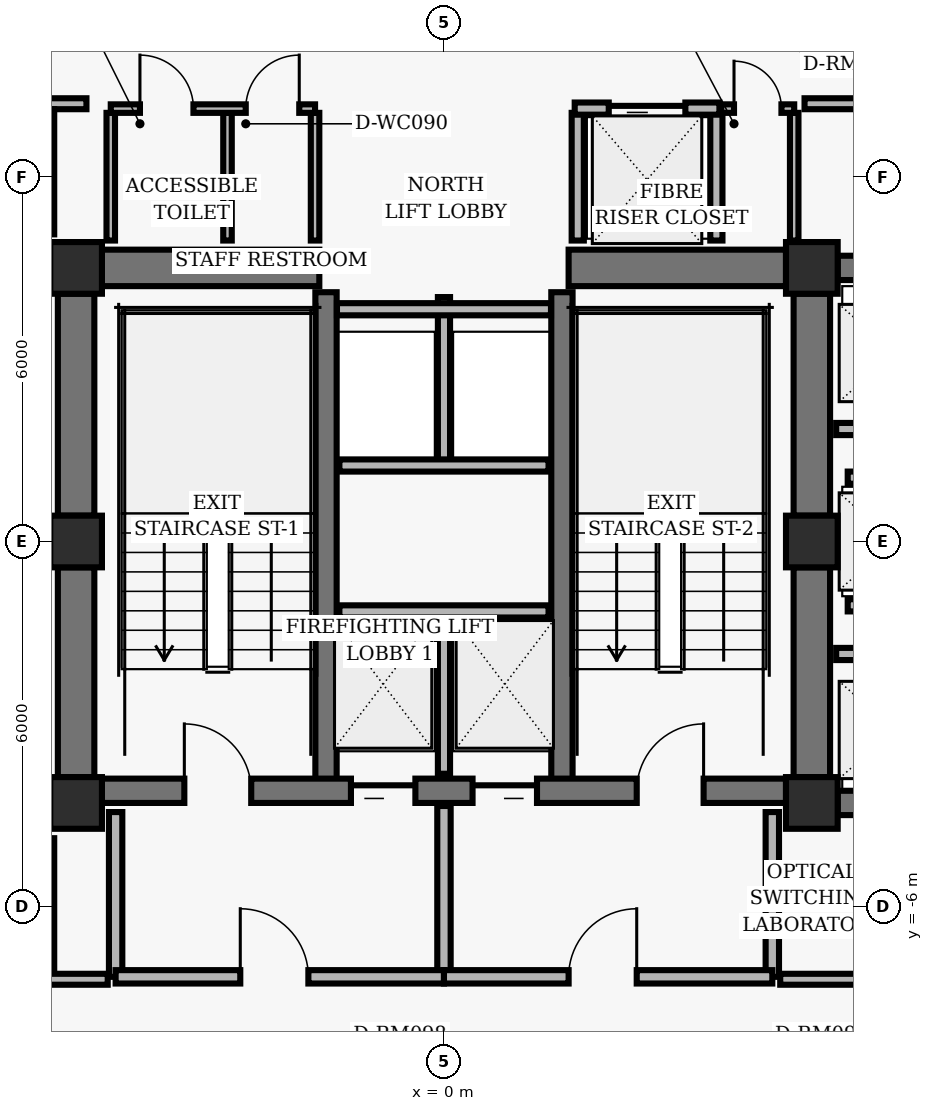
"""IFC4 building model, lengths in metres.
Left out: names, types, materials, properties, quantities, classifications, styles, units other than length and angle.
Written with IfcOpenShell. Run it as: python <this file> out.ifc"""

import sys

from ifc_helpers import new_model, si_unit, direction, frame, frame_2d, origin, origin_2d, place, context, subcontext, project, spatial, rectangle, hollow_rectangle, extrude, element, fill, save


model = new_model("IFC4")
c1 = context("Model", 3, precision=1e-05, world=origin(), true_north=direction((0.0, 1.0)))
c2 = subcontext(c1, "Body", "Model", "MODEL_VIEW")
j1 = project(units=[si_unit("LENGTHUNIT", "METRE"), si_unit("PLANEANGLEUNIT", "RADIAN")], contexts=[c1])
p1 = place(None, origin())
s1 = spatial("IfcSite", under=j1, at=p1, CompositionType="ELEMENT")
p2 = place(p1, origin())
s2 = spatial("IfcBuilding", under=s1, at=p2, CompositionType="ELEMENT")
p3 = place(p2, frame((0.0, 0.0, 153.28)))
s3 = spatial("IfcBuildingStorey", under=s2, at=p3, CompositionType="ELEMENT", Elevation=153.28)
for number, where, z_axis, x_axis in (
    (1, (-6.05, 4.5, 0.0), (0.0, 0.0, 1.0), (1.0, 0.0, 0.0)),
    (2, (6.05, 4.5, 0.0), (0.0, 0.0, 1.0), (1.0, 0.0, 0.0)),
    (3, (-6.05, 0.0, 0.0), (0.0, 0.0, 1.0), (1.0, 0.0, 0.0)),
    (4, (6.05, 0.0, 0.0), (0.0, 0.0, 1.0), (1.0, 0.0, 0.0)),
    (5, (-6.05, -4.3, 0.0), (0.0, 0.0, 1.0), (1.0, 0.0, 0.0)),
    (6, (6.05, -4.3, 0.0), (0.0, 0.0, 1.0), (1.0, 0.0, 0.0)),
):
    element("IfcColumn", number, at=place(p3, frame(where, z_axis=z_axis, x_axis=x_axis)), inside=s3, PredefinedType="COLUMN", context=c2, shape_type="SweptSolid", body=[
        extrude(hollow_rectangle(XDim=0.85, YDim=0.85, WallThickness=0.055, InnerFilletRadius=0.02, OuterFilletRadius=0.04, at=origin_2d()), origin(), (0.0, 0.0, 1.0), 3.04),
    ])
p4 = place(p3, frame((-6.05, 0.425, 0.0), z_axis=(0.0, 0.0, 1.0), x_axis=(0.0, 1.0, 0.0)))
e7 = element("IfcWall", 7, at=p4, inside=s3, PredefinedType="SHEAR", context=c2, shape_type="SweptSolid", body=[
    extrude(rectangle(XDim=3.65, YDim=0.6, at=frame_2d((1.825, 0.0))), origin(), (0.0, 0.0, 1.0), 2.788),
])
p5 = place(p3, frame((-6.05, -3.875, 0.0), z_axis=(0.0, 0.0, 1.0), x_axis=(0.0, 1.0, 0.0)))
e8 = element("IfcWall", 8, at=p5, inside=s3, PredefinedType="SHEAR", context=c2, shape_type="SweptSolid", body=[
    extrude(rectangle(XDim=3.45, YDim=0.6, at=frame_2d((1.725, 0.0))), origin(), (0.0, 0.0, 1.0), 2.788),
])
p6 = place(p3, frame((6.05, 0.425, 0.0), z_axis=(0.0, 0.0, 1.0), x_axis=(0.0, 1.0, 0.0)))
e9 = element("IfcWall", 9, at=p6, inside=s3, PredefinedType="SHEAR", context=c2, shape_type="SweptSolid", body=[
    extrude(rectangle(XDim=3.65, YDim=0.6, at=frame_2d((1.825, 0.0))), origin(), (0.0, 0.0, 1.0), 2.788),
])
p7 = place(p3, frame((6.05, -3.875, 0.0), z_axis=(0.0, 0.0, 1.0), x_axis=(0.0, 1.0, 0.0)))
e10 = element("IfcWall", 10, at=p7, inside=s3, PredefinedType="SHEAR", context=c2, shape_type="SweptSolid", body=[
    extrude(rectangle(XDim=3.45, YDim=0.6, at=frame_2d((1.725, 0.0))), origin(), (0.0, 0.0, 1.0), 2.788),
])
for number, where, z_axis, x_axis in (
    (11, (-1.94, -4.1, 0.0), (0.0, 0.0, 1.0), (0.0, 1.0, 0.0)),
    (12, (1.94, -4.1, 0.0), (0.0, 0.0, 1.0), (0.0, 1.0, 0.0)),
):
    element("IfcWall", number, at=place(p3, frame(where, z_axis=z_axis, x_axis=x_axis)), inside=s3, PredefinedType="SHEAR", context=c2, shape_type="SweptSolid", body=[
        extrude(rectangle(XDim=8.2, YDim=0.35, at=frame_2d((4.1, 0.0))), origin(), (0.0, 0.0, 1.0), 2.788),
    ])
p8 = place(p3, frame((-5.625, -4.1, 0.0), z_axis=(0.0, 0.0, 1.0), x_axis=(1.0, 0.0, 0.0)))
e13 = element("IfcWall", 13, at=p8, inside=s3, PredefinedType="SHEAR", context=c2, shape_type="SweptSolid", body=[
    extrude(rectangle(XDim=11.25, YDim=0.4, at=frame_2d((5.625, 0.0))), origin(), (0.0, 0.0, 1.0), 2.788),
])
p9 = place(p8, frame((1.355, 0.0, 0.0)))
e14 = element("IfcOpeningElement", 14, at=p9, cuts=e13, PredefinedType="OPENING", context=c2, shape_type="SweptSolid", body=[
    extrude(rectangle(XDim=1.1, YDim=2.04, at=frame_2d((0.55, 1.02))), frame((0.0, 0.21, 0.0), z_axis=(0.0, -1.0, 0.0), x_axis=(1.0, 0.0, 0.0)), (0.0, 0.0, 1.0), 0.42),
])
p10 = place(p8, frame((8.795, 0.0, 0.0)))
e15 = element("IfcOpeningElement", 15, at=p10, cuts=e13, PredefinedType="OPENING", context=c2, shape_type="SweptSolid", body=[
    extrude(rectangle(XDim=1.1, YDim=2.04, at=frame_2d((0.55, 1.02))), frame((0.0, 0.21, 0.0), z_axis=(0.0, -1.0, 0.0), x_axis=(1.0, 0.0, 0.0)), (0.0, 0.0, 1.0), 0.42),
])
p11 = place(p8, frame((4.095, 0.0, 0.0)))
e16 = element("IfcOpeningElement", 16, at=p11, cuts=e13, PredefinedType="OPENING", context=c2, shape_type="SweptSolid", body=[
    extrude(rectangle(XDim=1.06, YDim=2.04, at=frame_2d((0.53, 1.02))), frame((0.0, 0.21, 0.0), z_axis=(0.0, -1.0, 0.0), x_axis=(1.0, 0.0, 0.0)), (0.0, 0.0, 1.0), 0.42),
])
p12 = place(p8, frame((6.095, 0.0, 0.0)))
e17 = element("IfcOpeningElement", 17, at=p12, cuts=e13, PredefinedType="OPENING", context=c2, shape_type="SweptSolid", body=[
    extrude(rectangle(XDim=1.06, YDim=2.04, at=frame_2d((0.53, 1.02))), frame((0.0, 0.21, 0.0), z_axis=(0.0, -1.0, 0.0), x_axis=(1.0, 0.0, 0.0)), (0.0, 0.0, 1.0), 0.42),
])
for number, where, z_axis, x_axis in (
    (18, (-5.625, 4.5, 0.0), (0.0, 0.0, 1.0), (1.0, 0.0, 0.0)),
    (19, (2.05, 4.5, 0.0), (0.0, 0.0, 1.0), (1.0, 0.0, 0.0)),
):
    element("IfcWall", number, at=place(p3, frame(where, z_axis=z_axis, x_axis=x_axis)), inside=s3, PredefinedType="SHEAR", context=c2, shape_type="SweptSolid", body=[
        extrude(rectangle(XDim=3.575, YDim=0.6, at=frame_2d((1.788, 0.0))), origin(), (0.0, 0.0, 1.0), 2.788),
    ])
for number, where, z_axis, x_axis in (
    (20, (6.475, 4.5, 0.0), (0.0, 0.0, 1.0), (1.0, 0.0, 0.0)),
    (21, (6.475, -4.3, 0.0), (0.0, 0.0, 1.0), (1.0, 0.0, 0.0)),
):
    element("IfcWall", number, at=place(p3, frame(where, z_axis=z_axis, x_axis=x_axis)), inside=s3, PredefinedType="SHEAR", context=c2, shape_type="SweptSolid", body=[
        extrude(rectangle(XDim=2.05, YDim=0.4, at=frame_2d((1.025, 0.0))), origin(), (0.0, 0.0, 1.0), 2.788),
    ])
p13 = place(p3, frame((0.0, -3.82, 0.0), z_axis=(0.0, 0.0, 1.0), x_axis=(0.0, 1.0, 0.0)))
e22 = element("IfcWall", 22, at=p13, inside=s3, PredefinedType="PARTITIONING", context=c2, shape_type="SweptSolid", body=[
    extrude(rectangle(XDim=2.67, YDim=0.2, at=frame_2d((1.335, 0.0))), origin(), (0.0, 0.0, 1.0), 2.763),
])
p14 = place(p3, frame((-1.72, -1.15, 0.0), z_axis=(0.0, 0.0, 1.0), x_axis=(1.0, 0.0, 0.0)))
e23 = element("IfcWall", 23, at=p14, inside=s3, PredefinedType="PARTITIONING", context=c2, shape_type="SweptSolid", body=[
    extrude(rectangle(XDim=3.44, YDim=0.2, at=frame_2d((1.72, 0.0))), origin(), (0.0, 0.0, 1.0), 2.763),
])
for number, where, z_axis, x_axis in (
    (24, (-5.4, -7.16, 0.0), (0.0, 0.0, 1.0), (0.0, 1.0, 0.0)),
    (25, (5.4, -7.16, 0.0), (0.0, 0.0, 1.0), (0.0, 1.0, 0.0)),
):
    element("IfcWall", number, at=place(p3, frame(where, z_axis=z_axis, x_axis=x_axis)), inside=s3, PredefinedType="PARTITIONING", context=c2, shape_type="SweptSolid", body=[
        extrude(rectangle(XDim=2.71, YDim=0.22, at=frame_2d((1.355, 0.0))), origin(), (0.0, 0.0, 1.0), 2.763),
    ])
p15 = place(p3, frame((0.0, -7.16, 0.0), z_axis=(0.0, 0.0, 1.0), x_axis=(0.0, 1.0, 0.0)))
e26 = element("IfcWall", 26, at=p15, inside=s3, PredefinedType="PARTITIONING", context=c2, shape_type="SweptSolid", body=[
    extrude(rectangle(XDim=2.81, YDim=0.22, at=frame_2d((1.405, 0.0))), origin(), (0.0, 0.0, 1.0), 2.763),
])
p16 = place(p3, frame((-5.4, -7.16, 0.0), z_axis=(0.0, 0.0, 1.0), x_axis=(1.0, 0.0, 0.0)))
e27 = element("IfcWall", 27, at=p16, inside=s3, PredefinedType="PARTITIONING", context=c2, shape_type="SweptSolid", body=[
    extrude(rectangle(XDim=5.4, YDim=0.22, at=frame_2d((2.7, 0.0))), origin(), (0.0, 0.0, 1.0), 2.33),
])
p17 = place(p16, frame((2.05, 0.0, 0.0)))
e28 = element("IfcOpeningElement", 28, at=p17, cuts=e27, PredefinedType="OPENING", context=c2, shape_type="SweptSolid", body=[
    extrude(rectangle(XDim=1.12, YDim=2.02, at=frame_2d((0.56, 1.01))), frame((0.0, 0.12, 0.0), z_axis=(0.0, -1.0, 0.0), x_axis=(1.0, 0.0, 0.0)), (0.0, 0.0, 1.0), 0.24),
])
p18 = place(p3, frame((0.0, -7.16, 0.0), z_axis=(0.0, 0.0, 1.0), x_axis=(1.0, 0.0, 0.0)))
e29 = element("IfcWall", 29, at=p18, inside=s3, PredefinedType="PARTITIONING", context=c2, shape_type="SweptSolid", body=[
    extrude(rectangle(XDim=5.4, YDim=0.22, at=frame_2d((2.7, 0.0))), origin(), (0.0, 0.0, 1.0), 2.33),
])
p19 = place(p18, frame((2.05, 0.0, 0.0)))
e30 = element("IfcOpeningElement", 30, at=p19, cuts=e29, PredefinedType="OPENING", context=c2, shape_type="SweptSolid", body=[
    extrude(rectangle(XDim=1.12, YDim=2.02, at=frame_2d((0.56, 1.01))), frame((0.0, 0.12, 0.0), z_axis=(0.0, -1.0, 0.0), x_axis=(1.0, 0.0, 0.0)), (0.0, 0.0, 1.0), 0.24),
])
p20 = place(p3, frame((0.0, 1.25, 0.0), z_axis=(0.0, 0.0, 1.0), x_axis=(0.0, 1.0, 0.0)))
e31 = element("IfcWall", 31, at=p20, inside=s3, PredefinedType="PARTITIONING", context=c2, shape_type="SweptSolid", body=[
    extrude(rectangle(XDim=2.77, YDim=0.2, at=frame_2d((1.385, 0.0))), origin(), (0.0, 0.0, 1.0), 2.763),
])
p21 = place(p3, frame((-1.72, 1.25, 0.0), z_axis=(0.0, 0.0, 1.0), x_axis=(1.0, 0.0, 0.0)))
e32 = element("IfcWall", 32, at=p21, inside=s3, PredefinedType="PARTITIONING", context=c2, shape_type="SweptSolid", body=[
    extrude(rectangle(XDim=3.44, YDim=0.2, at=frame_2d((1.72, 0.0))), origin(), (0.0, 0.0, 1.0), 2.763),
])
p22 = place(p3, frame((-1.76, 3.82, 0.0), z_axis=(0.0, 0.0, 1.0), x_axis=(1.0, 0.0, 0.0)))
e33 = element("IfcWall", 33, at=p22, inside=s3, PredefinedType="PARTITIONING", context=c2, shape_type="SweptSolid", body=[
    extrude(rectangle(XDim=3.52, YDim=0.2, at=frame_2d((1.76, 0.0))), origin(), (0.0, 0.0, 1.0), 2.763),
])
for number, where, z_axis, x_axis in (
    (34, (2.2, 4.95, 0.0), (0.0, 0.0, 1.0), (0.0, 1.0, 0.0)),
    (35, (4.48, 4.95, 0.0), (0.0, 0.0, 1.0), (0.0, 1.0, 0.0)),
):
    element("IfcWall", number, at=place(p3, frame(where, z_axis=z_axis, x_axis=x_axis)), inside=s3, PredefinedType="PARTITIONING", context=c2, shape_type="SweptSolid", body=[
        extrude(rectangle(XDim=2.1, YDim=0.2, at=frame_2d((1.05, 0.0))), origin(), (0.0, 0.0, 1.0), 2.763),
    ])
p23 = place(p3, frame((2.15, 7.12, 0.0), z_axis=(0.0, 0.0, 1.0), x_axis=(1.0, 0.0, 0.0)))
e36 = element("IfcWall", 36, at=p23, inside=s3, PredefinedType="PARTITIONING", context=c2, shape_type="SweptSolid", body=[
    extrude(rectangle(XDim=2.38, YDim=0.2, at=frame_2d((1.19, 0.0))), origin(), (0.0, 0.0, 1.0), 2.763),
])
p24 = place(p23, frame((0.56, 0.0, 0.0)))
e37 = element("IfcOpeningElement", 37, at=p24, cuts=e36, PredefinedType="OPENING", context=c2, shape_type="SweptSolid", body=[
    extrude(rectangle(XDim=1.26, YDim=2.06, at=frame_2d((0.63, 1.03))), frame((0.0, 0.11, 0.0), z_axis=(0.0, -1.0, 0.0), x_axis=(1.0, 0.0, 0.0)), (0.0, 0.0, 1.0), 0.22),
])
for number, where, z_axis, x_axis in (
    (38, (-5.48, 4.95, 0.0), (0.0, 0.0, 1.0), (0.0, 1.0, 0.0)),
    (39, (-3.56, 4.95, 0.0), (0.0, 0.0, 1.0), (0.0, 1.0, 0.0)),
    (40, (-2.12, 4.95, 0.0), (0.0, 0.0, 1.0), (0.0, 1.0, 0.0)),
):
    element("IfcWall", number, at=place(p3, frame(where, z_axis=z_axis, x_axis=x_axis)), inside=s3, PredefinedType="PARTITIONING", context=c2, shape_type="SweptSolid", body=[
        extrude(rectangle(XDim=2.1, YDim=0.14, at=frame_2d((1.05, 0.0))), origin(), (0.0, 0.0, 1.0), 2.763),
    ])
p25 = place(p3, frame((-5.48, 7.12, 0.0), z_axis=(0.0, 0.0, 1.0), x_axis=(1.0, 0.0, 0.0)))
e41 = element("IfcWall", 41, at=p25, inside=s3, PredefinedType="PARTITIONING", context=c2, shape_type="SweptSolid", body=[
    extrude(rectangle(XDim=3.36, YDim=0.14, at=frame_2d((1.68, 0.0))), origin(), (0.0, 0.0, 1.0), 2.763),
])
p26 = place(p25, frame((0.48, 0.0, 0.0)))
e42 = element("IfcOpeningElement", 42, at=p26, cuts=e41, PredefinedType="OPENING", context=c2, shape_type="SweptSolid", body=[
    extrude(rectangle(XDim=0.88, YDim=2.02, at=frame_2d((0.44, 1.01))), frame((0.0, 0.08, 0.0), z_axis=(0.0, -1.0, 0.0), x_axis=(1.0, 0.0, 0.0)), (0.0, 0.0, 1.0), 0.16),
])
p27 = place(p25, frame((2.22, 0.0, 0.0)))
e43 = element("IfcOpeningElement", 43, at=p27, cuts=e41, PredefinedType="OPENING", context=c2, shape_type="SweptSolid", body=[
    extrude(rectangle(XDim=0.88, YDim=2.02, at=frame_2d((0.44, 1.01))), frame((0.0, 0.08, 0.0), z_axis=(0.0, -1.0, 0.0), x_axis=(1.0, 0.0, 0.0)), (0.0, 0.0, 1.0), 0.16),
])
p28 = place(p3, frame((5.76, 4.95, 0.0), z_axis=(0.0, 0.0, 1.0), x_axis=(0.0, 1.0, 0.0)))
e44 = element("IfcWall", 44, at=p28, inside=s3, PredefinedType="PARTITIONING", context=c2, shape_type="SweptSolid", body=[
    extrude(rectangle(XDim=2.1, YDim=0.14, at=frame_2d((1.05, 0.0))), origin(), (0.0, 0.0, 1.0), 2.763),
])
p29 = place(p3, frame((4.56, 7.12, 0.0), z_axis=(0.0, 0.0, 1.0), x_axis=(1.0, 0.0, 0.0)))
e45 = element("IfcWall", 45, at=p29, inside=s3, PredefinedType="PARTITIONING", context=c2, shape_type="SweptSolid", body=[
    extrude(rectangle(XDim=1.2, YDim=0.14, at=frame_2d((0.6, 0.0))), origin(), (0.0, 0.0, 1.0), 2.763),
])
p30 = place(p29, frame((0.21, 0.0, 0.0)))
e46 = element("IfcOpeningElement", 46, at=p30, cuts=e45, PredefinedType="OPENING", context=c2, shape_type="SweptSolid", body=[
    extrude(rectangle(XDim=0.78, YDim=2.01, at=frame_2d((0.39, 1.005))), frame((0.0, 0.08, 0.0), z_axis=(0.0, -1.0, 0.0), x_axis=(1.0, 0.0, 0.0)), (0.0, 0.0, 1.0), 0.16),
])
for number, where, z_axis, x_axis in (
    (47, (6.45, -1.85, 0.0), (0.0, 0.0, 1.0), (1.0, 0.0, 0.0)),
    (48, (6.45, 1.85, 0.0), (0.0, 0.0, 1.0), (1.0, 0.0, 0.0)),
):
    element("IfcWall", number, at=place(p3, frame(where, z_axis=z_axis, x_axis=x_axis)), inside=s3, PredefinedType="PARTITIONING", context=c2, shape_type="SweptSolid", body=[
        extrude(rectangle(XDim=2.1, YDim=0.2, at=frame_2d((1.05, 0.0))), origin(), (0.0, 0.0, 1.0), 2.763),
    ])
for number, where, z_axis, x_axis in (
    (49, (6.64, -1.05, 0.0), (0.0, 0.0, 1.0), (1.0, 0.0, 0.0)),
    (50, (6.64, 1.05, 0.0), (0.0, 0.0, 1.0), (1.0, 0.0, 0.0)),
):
    element("IfcWall", number, at=place(p3, frame(where, z_axis=z_axis, x_axis=x_axis)), inside=s3, PredefinedType="PARTITIONING", context=c2, shape_type="SweptSolid", body=[
        extrude(rectangle(XDim=1.91, YDim=0.2, at=frame_2d((0.955, 0.0))), origin(), (0.0, 0.0, 1.0), 2.763),
    ])
p31 = place(p3, frame((10.814, 7.2, 0.0), z_axis=(0.0, 0.0, 1.0), x_axis=(-1.0, 0.0, 0.0)))
e51 = element("IfcWall", 51, at=p31, inside=s3, PredefinedType="PARTITIONING", context=c2, shape_type="SweptSolid", body=[
    extrude(rectangle(XDim=4.884, YDim=0.18, at=frame_2d((2.442, 0.0))), origin(), (0.0, 0.0, 1.0), 2.763),
])
p32 = place(p3, frame((-5.88, 7.2, 0.0), z_axis=(0.0, 0.0, 1.0), x_axis=(-1.0, 0.0, 0.0)))
e52 = element("IfcWall", 52, at=p32, inside=s3, PredefinedType="PARTITIONING", context=c2, shape_type="SweptSolid", body=[
    extrude(rectangle(XDim=0.71, YDim=0.18, at=frame_2d((0.355, 0.0))), origin(), (0.0, 0.0, 1.0), 2.763),
])
p33 = place(p3, frame((-6.5, 7.11, 0.0), z_axis=(0.0, 0.0, 1.0), x_axis=(0.0, -1.0, 0.0)))
e53 = element("IfcWall", 53, at=p33, inside=s3, PredefinedType="PARTITIONING", context=c2, shape_type="SweptSolid", body=[
    extrude(rectangle(XDim=2.058, YDim=0.18, at=frame_2d((1.029, 0.0))), origin(), (0.0, 0.0, 1.0), 2.763),
])
p34 = place(p3, frame((-6.5, -4.88, 0.0), z_axis=(0.0, 0.0, 1.0), x_axis=(0.0, -1.0, 0.0)))
e54 = element("IfcWall", 54, at=p34, inside=s3, PredefinedType="PARTITIONING", context=c2, shape_type="SweptSolid", body=[
    extrude(rectangle(XDim=2.23, YDim=0.18, at=frame_2d((1.115, 0.0))), origin(), (0.0, 0.0, 1.0), 2.763),
])
p35 = place(p3, frame((-6.59, -7.2, 0.0), z_axis=(0.0, 0.0, 1.0), x_axis=(1.0, 0.0, 0.0)))
e55 = element("IfcWall", 55, at=p35, inside=s3, PredefinedType="PARTITIONING", context=c2, shape_type="SweptSolid", body=[
    extrude(rectangle(XDim=1.06, YDim=0.18, at=frame_2d((0.53, 0.0))), origin(), (0.0, 0.0, 1.0), 2.763),
])
p36 = place(p3, frame((5.53, -7.2, 0.0), z_axis=(0.0, 0.0, 1.0), x_axis=(1.0, 0.0, 0.0)))
e56 = element("IfcWall", 56, at=p36, inside=s3, PredefinedType="PARTITIONING", context=c2, shape_type="SweptSolid", body=[
    extrude(rectangle(XDim=5.52, YDim=0.18, at=frame_2d((2.76, 0.0))), origin(), (0.0, 0.0, 1.0), 2.33),
])
p37 = place(p36, frame((2.25, 0.0, 0.0)))
e57 = element("IfcOpeningElement", 57, at=p37, cuts=e56, PredefinedType="OPENING", context=c2, shape_type="SweptSolid", body=[
    extrude(rectangle(XDim=1.02, YDim=2.02, at=frame_2d((0.51, 1.01))), frame((0.0, 0.1, 0.0), z_axis=(0.0, -1.0, 0.0), x_axis=(1.0, 0.0, 0.0)), (0.0, 0.0, 1.0), 0.2),
])
p38 = place(p9, origin())
e58 = element("IfcDoor", 58, at=p38, inside=s3, OperationType="SINGLE_SWING_LEFT", PredefinedType="DOOR", context=c2, shape_type="SweptSolid", body=[
    extrude(rectangle(XDim=1.1, YDim=2.04, at=frame_2d((0.55, 1.02))), frame((0.0, 0.025, 0.0), z_axis=(0.0, -1.0, 0.0), x_axis=(1.0, 0.0, 0.0)), (0.0, 0.0, 1.0), 0.05),
])
fill(e14, e58)
p39 = place(p10, origin())
e59 = element("IfcDoor", 59, at=p39, inside=s3, OperationType="SINGLE_SWING_RIGHT", PredefinedType="DOOR", context=c2, shape_type="SweptSolid", body=[
    extrude(rectangle(XDim=1.1, YDim=2.04, at=frame_2d((0.55, 1.02))), frame((0.0, 0.025, 0.0), z_axis=(0.0, -1.0, 0.0), x_axis=(1.0, 0.0, 0.0)), (0.0, 0.0, 1.0), 0.05),
])
fill(e15, e59)
p40 = place(p11, origin())
e60 = element("IfcDoor", 60, at=p40, inside=s3, OperationType="SLIDING_TO_LEFT", PredefinedType="DOOR", context=c2, shape_type="SweptSolid", body=[
    extrude(rectangle(XDim=1.06, YDim=2.04, at=frame_2d((0.53, 1.02))), frame((0.0, 0.025, 0.0), z_axis=(0.0, -1.0, 0.0), x_axis=(1.0, 0.0, 0.0)), (0.0, 0.0, 1.0), 0.05),
])
fill(e16, e60)
p41 = place(p12, origin())
e61 = element("IfcDoor", 61, at=p41, inside=s3, OperationType="SLIDING_TO_RIGHT", PredefinedType="DOOR", context=c2, shape_type="SweptSolid", body=[
    extrude(rectangle(XDim=1.06, YDim=2.04, at=frame_2d((0.53, 1.02))), frame((0.0, 0.025, 0.0), z_axis=(0.0, -1.0, 0.0), x_axis=(1.0, 0.0, 0.0)), (0.0, 0.0, 1.0), 0.05),
])
fill(e17, e61)
p42 = place(p17, origin())
e62 = element("IfcDoor", 62, at=p42, inside=s3, OperationType="SINGLE_SWING_LEFT", PredefinedType="DOOR", context=c2, shape_type="SweptSolid", body=[
    extrude(rectangle(XDim=1.12, YDim=2.02, at=frame_2d((0.56, 1.01))), frame((0.0, 0.025, 0.0), z_axis=(0.0, -1.0, 0.0), x_axis=(1.0, 0.0, 0.0)), (0.0, 0.0, 1.0), 0.05),
])
fill(e28, e62)
p43 = place(p19, origin())
e63 = element("IfcDoor", 63, at=p43, inside=s3, OperationType="SINGLE_SWING_RIGHT", PredefinedType="DOOR", context=c2, shape_type="SweptSolid", body=[
    extrude(rectangle(XDim=1.12, YDim=2.02, at=frame_2d((0.56, 1.01))), frame((0.0, 0.025, 0.0), z_axis=(0.0, -1.0, 0.0), x_axis=(1.0, 0.0, 0.0)), (0.0, 0.0, 1.0), 0.05),
])
fill(e30, e63)
p44 = place(p24, origin())
e64 = element("IfcDoor", 64, at=p44, inside=s3, OperationType="SLIDING_TO_LEFT", PredefinedType="DOOR", context=c2, shape_type="SweptSolid", body=[
    extrude(rectangle(XDim=1.26, YDim=2.06, at=frame_2d((0.63, 1.03))), frame((0.0, 0.025, 0.0), z_axis=(0.0, -1.0, 0.0), x_axis=(1.0, 0.0, 0.0)), (0.0, 0.0, 1.0), 0.05),
])
fill(e37, e64)
p45 = place(p26, origin())
e65 = element("IfcDoor", 65, at=p45, inside=s3, OperationType="SINGLE_SWING_LEFT", PredefinedType="DOOR", context=c2, shape_type="SweptSolid", body=[
    extrude(rectangle(XDim=0.88, YDim=2.02, at=frame_2d((0.44, 1.01))), frame((0.0, 0.025, 0.0), z_axis=(0.0, -1.0, 0.0), x_axis=(1.0, 0.0, 0.0)), (0.0, 0.0, 1.0), 0.05),
])
fill(e42, e65)
p46 = place(p27, origin())
e66 = element("IfcDoor", 66, at=p46, inside=s3, OperationType="SINGLE_SWING_RIGHT", PredefinedType="DOOR", context=c2, shape_type="SweptSolid", body=[
    extrude(rectangle(XDim=0.88, YDim=2.02, at=frame_2d((0.44, 1.01))), frame((0.0, 0.025, 0.0), z_axis=(0.0, -1.0, 0.0), x_axis=(1.0, 0.0, 0.0)), (0.0, 0.0, 1.0), 0.05),
])
fill(e43, e66)
p47 = place(p30, origin())
e67 = element("IfcDoor", 67, at=p47, inside=s3, OperationType="SINGLE_SWING_LEFT", PredefinedType="DOOR", context=c2, shape_type="SweptSolid", body=[
    extrude(rectangle(XDim=0.78, YDim=2.01, at=frame_2d((0.39, 1.005))), frame((0.0, 0.025, 0.0), z_axis=(0.0, -1.0, 0.0), x_axis=(1.0, 0.0, 0.0)), (0.0, 0.0, 1.0), 0.05),
])
fill(e46, e67)
save(model, sys.argv[1])
